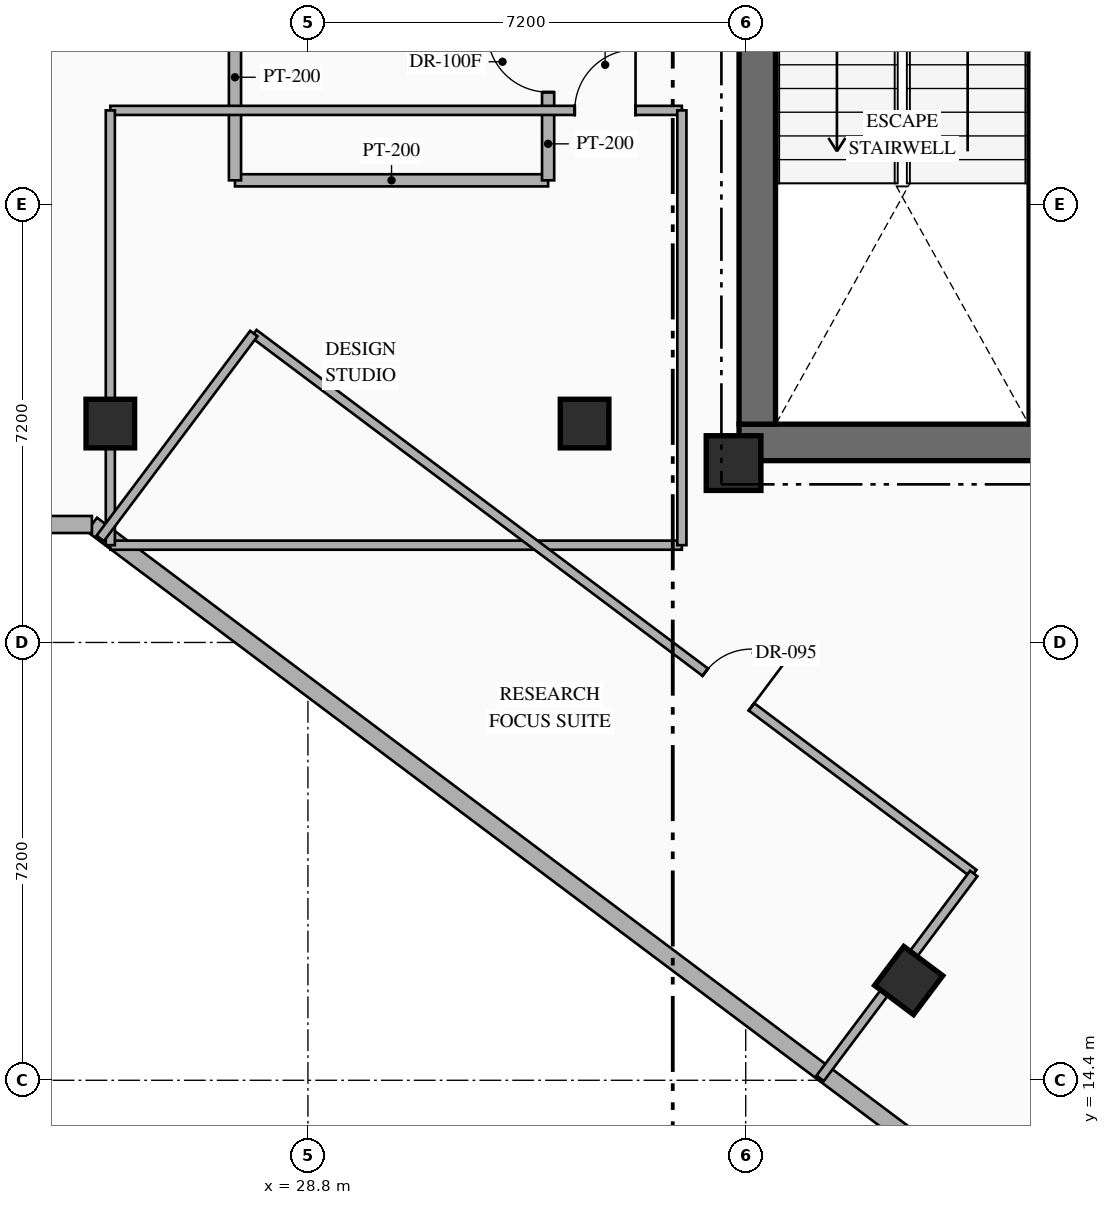
"""IFC4 building model, lengths in metres.
Left out: names, types, materials, properties, quantities, classifications, styles, units other than length and angle.
Written with IfcOpenShell. Run it as: python <this file> out.ifc"""

import sys

from ifc_helpers import new_model, si_unit, direction, frame, frame_2d, origin, origin_2d, place, context, subcontext, project, spatial, rectangle, hollow_rectangle, extrude, element, fill, save


model = new_model("IFC4")
c1 = context("Model", 3, precision=1e-05, world=origin(), true_north=direction((0.0, 1.0)))
c2 = subcontext(c1, "Body", "Model", "MODEL_VIEW")
j1 = project(units=[si_unit("LENGTHUNIT", "METRE"), si_unit("PLANEANGLEUNIT", "RADIAN")], contexts=[c1])
p1 = place(None, origin())
s1 = spatial("IfcSite", under=j1, at=p1, CompositionType="ELEMENT")
p2 = place(p1, origin())
s2 = spatial("IfcBuilding", under=s1, at=p2, CompositionType="ELEMENT")
p3 = place(p2, frame((0.0, 0.0, 170.85)))
s3 = spatial("IfcBuildingStorey", under=s2, at=p3, CompositionType="ELEMENT", Elevation=170.85)
p4 = place(p3, frame((35.89, 24.89, 0.0), z_axis=(0.0, 0.0, 1.0), x_axis=(1.0, 0.0, 0.0)))
e1 = element("IfcWall", 1, at=p4, inside=s3, PredefinedType="SHEAR", context=c2, shape_type="SweptSolid", body=[
    extrude(rectangle(XDim=7.76, YDim=0.6, at=frame_2d((3.88, 0.0))), origin(), (0.0, 0.0, 1.0), 3.6),
])
p5 = place(p3, frame((36.19, 25.19, 0.0), z_axis=(0.0, 0.0, 1.0), x_axis=(0.0, 1.0, 0.0)))
e2 = element("IfcWall", 2, at=p5, inside=s3, PredefinedType="SHEAR", context=c2, shape_type="SweptSolid", body=[
    extrude(rectangle(XDim=9.48, YDim=0.6, at=frame_2d((4.74, 0.0))), origin(), (0.0, 0.0, 1.0), 3.6),
])
p6 = place(p3, frame((40.81, 25.19, 0.0), z_axis=(0.0, 0.0, 1.0), x_axis=(0.0, 1.0, 0.0)))
e3 = element("IfcWall", 3, at=p6, inside=s3, PredefinedType="SHEAR", context=c2, shape_type="SweptSolid", body=[
    extrude(rectangle(XDim=9.48, YDim=0.3, at=frame_2d((4.74, 0.0))), origin(), (0.0, 0.0, 1.0), 3.6),
])
p7 = place(p3, frame((35.8, 24.55, 0.0), z_axis=(0.0, 0.0, 1.0), x_axis=(1.0, 0.0, 0.0)))
e4 = element("IfcColumn", 4, at=p7, inside=s3, PredefinedType="COLUMN", context=c2, shape_type="SweptSolid", body=[
    extrude(rectangle(XDim=0.9, YDim=0.9, at=origin_2d()), origin(), (0.0, 0.0, 1.0), 3.6),
])
for number, where, z_axis, x_axis in (
    (5, (25.55, 25.2, 0.0), (0.0, 0.0, 1.0), (1.0, 0.0, 0.0)),
    (6, (33.35, 25.2, 0.0), (0.0, 0.0, 1.0), (1.0, 0.0, 0.0)),
    (7, (38.68, 16.04, 0.0), (0.0, 0.0, 1.0), (0.8, -0.6, 0.0)),
):
    element("IfcColumn", number, at=place(p3, frame(where, z_axis=z_axis, x_axis=x_axis)), inside=s3, PredefinedType="COLUMN", context=c2, shape_type="SweptSolid", body=[
        extrude(hollow_rectangle(XDim=0.8, YDim=0.8, WallThickness=0.032, at=origin_2d()), origin(), (0.0, 0.0, 1.0), 3.6),
    ])
p8 = place(p3, frame((44.918, 8.787, 0.0), z_axis=(0.0, 0.0, 1.0), x_axis=(-0.800004765927, 0.599993645378, 0.0)))
e8 = element("IfcWall", 8, at=p8, inside=s3, PredefinedType="STANDARD", context=c2, shape_type="SweptSolid", body=[
    extrude(rectangle(XDim=24.588, YDim=0.28, at=frame_2d((12.294, 0.0))), origin(), (0.0, 0.0, 1.0), 3.35),
])
p9 = place(p3, frame((25.247, 23.54, 0.0), z_axis=(0.0, 0.0, 1.0), x_axis=(-1.0, 0.0, 0.0)))
e9 = element("IfcWall", 9, at=p9, inside=s3, PredefinedType="STANDARD", context=c2, shape_type="SweptSolid", body=[
    extrude(rectangle(XDim=6.747, YDim=0.28, at=frame_2d((3.374, 0.0))), origin(), (0.0, 0.0, 1.0), 3.35),
])
p10 = place(p3, frame((27.6, 29.2, 0.0), z_axis=(0.0, 0.0, 1.0), x_axis=(1.0, 0.0, 0.0)))
e10 = element("IfcWall", 10, at=p10, inside=s3, PredefinedType="STANDARD", context=c2, shape_type="SweptSolid", body=[
    extrude(rectangle(XDim=5.15, YDim=0.2, at=frame_2d((2.575, 0.0))), origin(), (0.0, 0.0, 1.0), 3.35),
])
p11 = place(p3, frame((27.6, 29.2, 0.0), z_axis=(0.0, 0.0, 1.0), x_axis=(0.0, 1.0, 0.0)))
e11 = element("IfcWall", 11, at=p11, inside=s3, PredefinedType="STANDARD", context=c2, shape_type="SweptSolid", body=[
    extrude(rectangle(XDim=3.39, YDim=0.2, at=frame_2d((1.695, 0.0))), origin(), (0.0, 0.0, 1.0), 3.35),
])
p12 = place(p3, frame((32.75, 29.2, 0.0), z_axis=(0.0, 0.0, 1.0), x_axis=(0.0, 1.0, 0.0)))
e12 = element("IfcWall", 12, at=p12, inside=s3, PredefinedType="STANDARD", context=c2, shape_type="SweptSolid", body=[
    extrude(rectangle(XDim=3.39, YDim=0.2, at=frame_2d((1.695, 0.0))), origin(), (0.0, 0.0, 1.0), 3.35),
])
p13 = place(p12, frame((1.45, 0.0, 0.0)))
e13 = element("IfcOpeningElement", 13, at=p13, cuts=e12, PredefinedType="OPENING", context=c2, shape_type="SweptSolid", body=[
    extrude(rectangle(XDim=1.0, YDim=2.2, at=frame_2d((0.5, 1.1))), frame((0.0, 0.11, 0.0), z_axis=(0.0, -1.0, 0.0), x_axis=(1.0, 0.0, 0.0)), (0.0, 0.0, 1.0), 0.22),
])
p14 = place(p3, frame((25.55, 23.2, 0.0), z_axis=(0.0, 0.0, 1.0), x_axis=(1.0, 0.0, 0.0)))
e14 = element("IfcWall", 14, at=p14, inside=s3, PredefinedType="PARTITIONING", context=c2, shape_type="SweptSolid", body=[
    extrude(rectangle(XDim=9.4, YDim=0.15, at=frame_2d((4.7, 0.0))), origin(), (0.0, 0.0, 1.0), 3.35),
])
p15 = place(p3, frame((25.55, 30.35, 0.0), z_axis=(0.0, 0.0, 1.0), x_axis=(1.0, 0.0, 0.0)))
e15 = element("IfcWall", 15, at=p15, inside=s3, PredefinedType="PARTITIONING", context=c2, shape_type="SweptSolid", body=[
    extrude(rectangle(XDim=9.4, YDim=0.15, at=frame_2d((4.7, 0.0))), origin(), (0.0, 0.0, 1.0), 3.35),
])
p16 = place(p15, frame((7.638, 0.0, 0.0)))
e16 = element("IfcOpeningElement", 16, at=p16, cuts=e15, PredefinedType="OPENING", context=c2, shape_type="SweptSolid", body=[
    extrude(rectangle(XDim=1.0, YDim=2.15, at=frame_2d((0.5, 1.075))), frame((0.0, 0.085, 0.0), z_axis=(0.0, -1.0, 0.0), x_axis=(1.0, 0.0, 0.0)), (0.0, 0.0, 1.0), 0.17),
])
p17 = place(p3, frame((25.55, 23.2, 0.0), z_axis=(0.0, 0.0, 1.0), x_axis=(0.0, 1.0, 0.0)))
e17 = element("IfcWall", 17, at=p17, inside=s3, PredefinedType="PARTITIONING", context=c2, shape_type="SweptSolid", body=[
    extrude(rectangle(XDim=7.15, YDim=0.15, at=frame_2d((3.575, 0.0))), origin(), (0.0, 0.0, 1.0), 2.695),
])
p18 = place(p3, frame((34.95, 23.2, 0.0), z_axis=(0.0, 0.0, 1.0), x_axis=(0.0, 1.0, 0.0)))
e18 = element("IfcWall", 18, at=p18, inside=s3, PredefinedType="PARTITIONING", context=c2, shape_type="SweptSolid", body=[
    extrude(rectangle(XDim=7.15, YDim=0.15, at=frame_2d((3.575, 0.0))), origin(), (0.0, 0.0, 1.0), 3.35),
])
p19 = place(p3, frame((27.91, 26.68, 0.0), z_axis=(0.0, 0.0, 1.0), x_axis=(0.800005938517, -0.599992081896, 0.0)))
e19 = element("IfcWall", 19, at=p19, inside=s3, PredefinedType="PARTITIONING", context=c2, shape_type="SweptSolid", body=[
    extrude(rectangle(XDim=14.8, YDim=0.15, at=frame_2d((7.4, 0.0))), origin(), (0.0, 0.0, 1.0), 3.35),
])
p20 = place(p19, frame((9.281, 0.0, 0.0)))
e20 = element("IfcOpeningElement", 20, at=p20, cuts=e19, PredefinedType="OPENING", context=c2, shape_type="SweptSolid", body=[
    extrude(rectangle(XDim=0.95, YDim=2.15, at=frame_2d((0.475, 1.075))), frame((0.0, 0.085, 0.0), z_axis=(0.0, -1.0, 0.0), x_axis=(1.0, 0.0, 0.0)), (0.0, 0.0, 1.0), 0.17),
])
p21 = place(p3, frame((25.384, 23.312, 0.0), z_axis=(0.0, 0.0, 1.0), x_axis=(0.599990721155, 0.80000695905, 0.0)))
e21 = element("IfcWall", 21, at=p21, inside=s3, PredefinedType="PARTITIONING", context=c2, shape_type="SweptSolid", body=[
    extrude(rectangle(XDim=4.21, YDim=0.15, at=frame_2d((2.105, 0.0))), origin(), (0.0, 0.0, 1.0), 3.35),
])
p22 = place(p3, frame((37.224, 14.432, 0.0), z_axis=(0.0, 0.0, 1.0), x_axis=(0.599962885857, 0.800027834262, 0.0)))
e22 = element("IfcWall", 22, at=p22, inside=s3, PredefinedType="PARTITIONING", context=c2, shape_type="SweptSolid", body=[
    extrude(rectangle(XDim=4.21, YDim=0.15, at=frame_2d((2.105, 0.0))), origin(), (0.0, 0.0, 1.0), 2.695),
])
p23 = place(p13, origin())
e23 = element("IfcDoor", 23, at=p23, inside=s3, OperationType="SINGLE_SWING_RIGHT", PredefinedType="DOOR", context=c2, shape_type="SweptSolid", body=[
    extrude(rectangle(XDim=1.0, YDim=2.2, at=frame_2d((0.5, 1.1))), frame((0.0, 0.025, 0.0), z_axis=(0.0, -1.0, 0.0), x_axis=(1.0, 0.0, 0.0)), (0.0, 0.0, 1.0), 0.05),
])
fill(e13, e23)
p24 = place(p16, origin())
e24 = element("IfcDoor", 24, at=p24, inside=s3, OperationType="SINGLE_SWING_RIGHT", PredefinedType="DOOR", context=c2, shape_type="SweptSolid", body=[
    extrude(rectangle(XDim=1.0, YDim=2.15, at=frame_2d((0.5, 1.075))), frame((0.0, 0.025, 0.0), z_axis=(0.0, -1.0, 0.0), x_axis=(1.0, 0.0, 0.0)), (0.0, 0.0, 1.0), 0.05),
])
fill(e16, e24)
p25 = place(p20, origin())
e25 = element("IfcDoor", 25, at=p25, inside=s3, OperationType="SINGLE_SWING_RIGHT", PredefinedType="DOOR", context=c2, shape_type="SweptSolid", body=[
    extrude(rectangle(XDim=0.95, YDim=2.15, at=frame_2d((0.475, 1.075))), frame((0.0, 0.025, 0.0), z_axis=(0.0, -1.0, 0.0), x_axis=(1.0, 0.0, 0.0)), (0.0, 0.0, 1.0), 0.05),
])
fill(e20, e25)
save(model, sys.argv[1])
